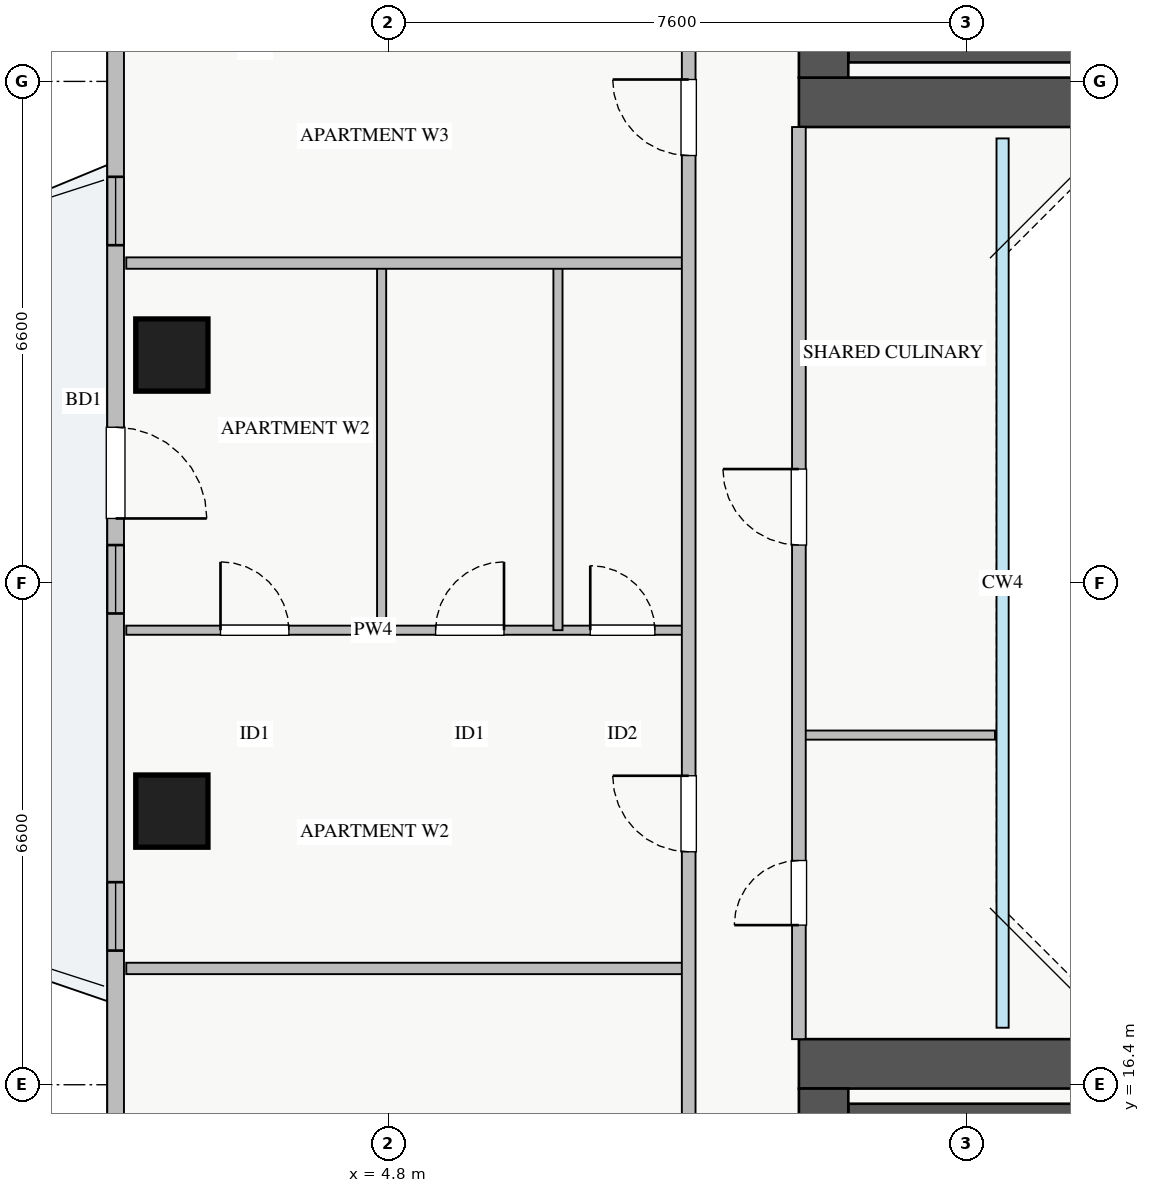
"""IFC4 building model, lengths in metres.
Left out: names, types, materials, properties, quantities, classifications, styles, units other than length and angle.
Written with IfcOpenShell. Run it as: python <this file> out.ifc"""

import sys

from ifc_helpers import new_model, si_unit, direction, frame, frame_2d, origin, origin_2d, place, context, subcontext, project, spatial, rectangle, extrude, source, transform, mapped, element, fill, save


model = new_model("IFC4")
c1 = context("Model", 3, precision=1e-05, world=origin(), true_north=direction((0.0, 1.0)))
c2 = subcontext(c1, "Body", "Model", "MODEL_VIEW")
j1 = project(units=[si_unit("LENGTHUNIT", "METRE"), si_unit("PLANEANGLEUNIT", "RADIAN")], contexts=[c1])
p1 = place(None, origin())
s1 = spatial("IfcSite", under=j1, at=p1, CompositionType="ELEMENT")
p2 = place(p1, origin())
s2 = spatial("IfcBuilding", under=s1, at=p2, CompositionType="ELEMENT")
p3 = place(p2, frame((0.0, 0.0, 143.75)))
s3 = spatial("IfcBuildingStorey", under=s2, at=p3, CompositionType="ELEMENT", Elevation=143.75)
for number, where, z_axis, x_axis in (
    (1, (10.85, 29.95, 0.0), (0.0, 0.0, 1.0), (1.0, 0.0, 0.0)),
    (2, (10.85, 16.05, 0.0), (0.0, 0.0, 1.0), (1.0, 0.0, 0.0)),
):
    element("IfcWall", number, at=place(p3, frame(where, z_axis=z_axis, x_axis=x_axis)), inside=s3, PredefinedType="SHEAR", context=c2, shape_type="SweptSolid", body=[
        extrude(rectangle(XDim=7.3, YDim=0.2, at=frame_2d((3.65, 0.0))), origin(), (0.0, 0.0, 1.0), 3.25),
    ])
p4 = place(p3, frame((10.2, 29.325, 0.0), z_axis=(0.0, 0.0, 1.0), x_axis=(1.0, 0.0, 0.0)))
e3 = element("IfcWall", 3, at=p4, inside=s3, PredefinedType="SHEAR", context=c2, shape_type="SweptSolid", body=[
    extrude(rectangle(XDim=17.6, YDim=0.65, at=frame_2d((8.8, 0.0))), origin(), (0.0, 0.0, 1.0), 3.25),
])
p5 = place(p3, frame((10.525, 29.65, 0.0), z_axis=(0.0, 0.0, 1.0), x_axis=(0.0, 1.0, 0.0)))
e4 = element("IfcWall", 4, at=p5, inside=s3, PredefinedType="SHEAR", context=c2, shape_type="SweptSolid", body=[
    extrude(rectangle(XDim=5.9, YDim=0.65, at=frame_2d((2.95, 0.0))), origin(), (0.0, 0.0, 1.0), 3.25),
])
p6 = place(p3, frame((10.2, 16.675, 0.0), z_axis=(0.0, 0.0, 1.0), x_axis=(1.0, 0.0, 0.0)))
e5 = element("IfcWall", 5, at=p6, inside=s3, PredefinedType="SHEAR", context=c2, shape_type="SweptSolid", body=[
    extrude(rectangle(XDim=17.6, YDim=0.65, at=frame_2d((8.8, 0.0))), origin(), (0.0, 0.0, 1.0), 3.25),
])
p7 = place(p3, frame((10.525, 10.45, 0.0), z_axis=(0.0, 0.0, 1.0), x_axis=(0.0, 1.0, 0.0)))
e6 = element("IfcWall", 6, at=p7, inside=s3, PredefinedType="SHEAR", context=c2, shape_type="SweptSolid", body=[
    extrude(rectangle(XDim=5.9, YDim=0.65, at=frame_2d((2.95, 0.0))), origin(), (0.0, 0.0, 1.0), 3.25),
])
m1 = source(origin(), c2, "Body", "SweptSolid", [
    extrude(rectangle(XDim=0.95, YDim=0.95, at=origin_2d()), origin(), (0.0, 0.0, 1.0), 3.25),
])
for number, where, z_axis, x_axis in (
    (7, (1.95, 26.0, 0.0), (0.0, 0.0, 1.0), (1.0, 0.0, 0.0)),
    (8, (1.95, 20.0, 0.0), (0.0, 0.0, 1.0), (1.0, 0.0, 0.0)),
):
    element("IfcColumn", number, at=place(p3, frame(where, z_axis=z_axis, x_axis=x_axis)), inside=s3, PredefinedType="COLUMN", context=c2, shape_type="MappedRepresentation", body=[
        mapped(m1, transform((0.0, 0.0, 0.0), x_axis=(1.0, 0.0, 0.0), y_axis=(0.0, 1.0, 0.0), z_axis=(0.0, 0.0, 1.0), scale=1.0)),
    ])
p8 = place(p3, frame((1.21, 10.55, 0.0), z_axis=(0.0, 0.0, 1.0), x_axis=(0.0, 1.0, 0.0)))
e9 = element("IfcWall", 9, at=p8, inside=s3, PredefinedType="STANDARD", context=c2, shape_type="SweptSolid", body=[
    extrude(rectangle(XDim=24.9, YDim=0.22, at=frame_2d((12.45, 0.0))), origin(), (0.0, 0.0, 1.0), 2.61),
])
p9 = place(p8, frame((13.3, 0.0, 0.0)))
e10 = element("IfcOpeningElement", 10, at=p9, cuts=e9, PredefinedType="OPENING", context=c2, shape_type="SweptSolid", body=[
    extrude(rectangle(XDim=1.2, YDim=2.1, at=frame_2d((0.6, 1.05))), frame((0.0, 0.12, 0.0), z_axis=(0.0, -1.0, 0.0), x_axis=(1.0, 0.0, 0.0)), (0.0, 0.0, 1.0), 0.24),
])
p10 = place(p8, frame((1.912, 0.0, 0.9)))
e11 = element("IfcOpeningElement", 11, at=p10, cuts=e9, PredefinedType="OPENING", context=c2, shape_type="SweptSolid", body=[
    extrude(rectangle(XDim=2.4, YDim=1.48, at=frame_2d((1.2, 0.74))), frame((0.0, 0.12, 0.0), z_axis=(0.0, -1.0, 0.0), x_axis=(1.0, 0.0, 0.0)), (0.0, 0.0, 1.0), 0.24),
])
p11 = place(p8, frame((21.82, 0.0, 0.9)))
e12 = element("IfcOpeningElement", 12, at=p11, cuts=e9, PredefinedType="OPENING", context=c2, shape_type="SweptSolid", body=[
    extrude(rectangle(XDim=2.1, YDim=1.5, at=frame_2d((1.05, 0.75))), frame((0.0, 0.12, 0.0), z_axis=(0.0, -1.0, 0.0), x_axis=(1.0, 0.0, 0.0)), (0.0, 0.0, 1.0), 0.24),
])
p12 = place(p8, frame((12.05, 0.0, 0.9)))
e13 = element("IfcOpeningElement", 13, at=p12, cuts=e9, PredefinedType="OPENING", context=c2, shape_type="SweptSolid", body=[
    extrude(rectangle(XDim=0.9, YDim=1.2, at=frame_2d((0.45, 0.6))), frame((0.0, 0.12, 0.0), z_axis=(0.0, -1.0, 0.0), x_axis=(1.0, 0.0, 0.0)), (0.0, 0.0, 1.0), 0.24),
])
p13 = place(p8, frame((7.615, 0.0, 0.9)))
e14 = element("IfcOpeningElement", 14, at=p13, cuts=e9, PredefinedType="OPENING", context=c2, shape_type="SweptSolid", body=[
    extrude(rectangle(XDim=0.9, YDim=1.2, at=frame_2d((0.45, 0.6))), frame((0.0, 0.12, 0.0), z_axis=(0.0, -1.0, 0.0), x_axis=(1.0, 0.0, 0.0)), (0.0, 0.0, 1.0), 0.24),
])
p14 = place(p8, frame((16.895, 0.0, 0.9)))
e15 = element("IfcOpeningElement", 15, at=p14, cuts=e9, PredefinedType="OPENING", context=c2, shape_type="SweptSolid", body=[
    extrude(rectangle(XDim=0.9, YDim=1.2, at=frame_2d((0.45, 0.6))), frame((0.0, 0.12, 0.0), z_axis=(0.0, -1.0, 0.0), x_axis=(1.0, 0.0, 0.0)), (0.0, 0.0, 1.0), 0.24),
])
p15 = place(p3, frame((1.35, 22.38, 0.0), z_axis=(0.0, 0.0, 1.0), x_axis=(1.0, 0.0, 0.0)))
e16 = element("IfcWall", 16, at=p15, inside=s3, PredefinedType="PLUMBINGWALL", context=c2, shape_type="SweptSolid", body=[
    extrude(rectangle(XDim=7.4, YDim=0.12, at=frame_2d((3.7, 0.0))), origin(), (0.0, 0.0, 1.0), 3.07),
])
p16 = place(p15, frame((1.24, 0.0, 0.0)))
e17 = element("IfcOpeningElement", 17, at=p16, cuts=e16, PredefinedType="OPENING", context=c2, shape_type="SweptSolid", body=[
    extrude(rectangle(XDim=0.9, YDim=2.05, at=frame_2d((0.45, 1.025))), frame((0.0, 0.07, 0.0), z_axis=(0.0, -1.0, 0.0), x_axis=(1.0, 0.0, 0.0)), (0.0, 0.0, 1.0), 0.14),
])
p17 = place(p15, frame((4.07, 0.0, 0.0)))
e18 = element("IfcOpeningElement", 18, at=p17, cuts=e16, PredefinedType="OPENING", context=c2, shape_type="SweptSolid", body=[
    extrude(rectangle(XDim=0.9, YDim=2.05, at=frame_2d((0.45, 1.025))), frame((0.0, 0.07, 0.0), z_axis=(0.0, -1.0, 0.0), x_axis=(1.0, 0.0, 0.0)), (0.0, 0.0, 1.0), 0.14),
])
p18 = place(p15, frame((6.105, 0.0, 0.0)))
e19 = element("IfcOpeningElement", 19, at=p18, cuts=e16, PredefinedType="OPENING", context=c2, shape_type="SweptSolid", body=[
    extrude(rectangle(XDim=0.85, YDim=2.05, at=frame_2d((0.425, 1.025))), frame((0.0, 0.07, 0.0), z_axis=(0.0, -1.0, 0.0), x_axis=(1.0, 0.0, 0.0)), (0.0, 0.0, 1.0), 0.14),
])
for number, where, z_axis, x_axis in (
    (20, (4.71, 22.38, 0.0), (0.0, 0.0, 1.0), (0.0, 1.0, 0.0)),
    (21, (7.03, 22.38, 0.0), (0.0, 0.0, 1.0), (0.0, 1.0, 0.0)),
):
    element("IfcWall", number, at=place(p3, frame(where, z_axis=z_axis, x_axis=x_axis)), inside=s3, PredefinedType="PLUMBINGWALL", context=c2, shape_type="SweptSolid", body=[
        extrude(rectangle(XDim=4.83, YDim=0.12, at=frame_2d((2.415, 0.0))), origin(), (0.0, 0.0, 1.0), 3.07),
    ])
for number, where, z_axis, x_axis in (
    (22, (1.35, 17.93, 0.0), (0.0, 0.0, 1.0), (1.0, 0.0, 0.0)),
    (23, (1.35, 27.21, 0.0), (0.0, 0.0, 1.0), (1.0, 0.0, 0.0)),
):
    element("IfcWall", number, at=place(p3, frame(where, z_axis=z_axis, x_axis=x_axis)), inside=s3, PredefinedType="PARTITIONING", context=c2, shape_type="SweptSolid", body=[
        extrude(rectangle(XDim=7.4, YDim=0.15, at=frame_2d((3.7, 0.0))), origin(), (0.0, 0.0, 1.0), 3.07),
    ])
p19 = place(p3, frame((8.75, 8.3, 0.0), z_axis=(0.0, 0.0, 1.0), x_axis=(0.0, 1.0, 0.0)))
e24 = element("IfcWall", 24, at=p19, inside=s3, PredefinedType="PARTITIONING", context=c2, shape_type="SweptSolid", body=[
    extrude(rectangle(XDim=29.4, YDim=0.18, at=frame_2d((14.7, 0.0))), origin(), (0.0, 0.0, 1.0), 3.07),
])
p20 = place(p19, frame((28.08, 0.0, 0.0)))
e25 = element("IfcOpeningElement", 25, at=p20, cuts=e24, PredefinedType="OPENING", context=c2, shape_type="SweptSolid", body=[
    extrude(rectangle(XDim=0.9, YDim=2.05, at=frame_2d((0.45, 1.025))), frame((0.0, 0.1, 0.0), z_axis=(0.0, -1.0, 0.0), x_axis=(1.0, 0.0, 0.0)), (0.0, 0.0, 1.0), 0.2),
])
p21 = place(p19, frame((0.245, 0.0, 0.0)))
e26 = element("IfcOpeningElement", 26, at=p21, cuts=e24, PredefinedType="OPENING", context=c2, shape_type="SweptSolid", body=[
    extrude(rectangle(XDim=0.9, YDim=2.05, at=frame_2d((0.45, 1.025))), frame((0.0, 0.1, 0.0), z_axis=(0.0, -1.0, 0.0), x_axis=(1.0, 0.0, 0.0)), (0.0, 0.0, 1.0), 0.2),
])
p22 = place(p19, frame((5.0, 0.0, 0.0)))
e27 = element("IfcOpeningElement", 27, at=p22, cuts=e24, PredefinedType="OPENING", context=c2, shape_type="SweptSolid", body=[
    extrude(rectangle(XDim=1.0, YDim=2.05, at=frame_2d((0.5, 1.025))), frame((0.0, 0.1, 0.0), z_axis=(0.0, -1.0, 0.0), x_axis=(1.0, 0.0, 0.0)), (0.0, 0.0, 1.0), 0.2),
])
p23 = place(p19, frame((11.165, 0.0, 0.0)))
e28 = element("IfcOpeningElement", 28, at=p23, cuts=e24, PredefinedType="OPENING", context=c2, shape_type="SweptSolid", body=[
    extrude(rectangle(XDim=1.0, YDim=2.05, at=frame_2d((0.5, 1.025))), frame((0.0, 0.1, 0.0), z_axis=(0.0, -1.0, 0.0), x_axis=(1.0, 0.0, 0.0)), (0.0, 0.0, 1.0), 0.2),
])
p24 = place(p19, frame((20.325, 0.0, 0.0)))
e29 = element("IfcOpeningElement", 29, at=p24, cuts=e24, PredefinedType="OPENING", context=c2, shape_type="SweptSolid", body=[
    extrude(rectangle(XDim=1.0, YDim=2.05, at=frame_2d((0.5, 1.025))), frame((0.0, 0.1, 0.0), z_axis=(0.0, -1.0, 0.0), x_axis=(1.0, 0.0, 0.0)), (0.0, 0.0, 1.0), 0.2),
])
p25 = place(p3, frame((10.2, 21.0, 0.0), z_axis=(0.0, 0.0, 1.0), x_axis=(1.0, 0.0, 0.0)))
e30 = element("IfcWall", 30, at=p25, inside=s3, PredefinedType="PLUMBINGWALL", context=c2, shape_type="SweptSolid", body=[
    extrude(rectangle(XDim=2.58, YDim=0.12, at=frame_2d((1.29, 0.0))), origin(), (0.0, 0.0, 1.0), 3.07),
])
p26 = place(p3, frame((10.2, 17.0, 0.0), z_axis=(0.0, 0.0, 1.0), x_axis=(0.0, 1.0, 0.0)))
e31 = element("IfcWall", 31, at=p26, inside=s3, PredefinedType="PARTITIONING", context=c2, shape_type="SweptSolid", body=[
    extrude(rectangle(XDim=12.0, YDim=0.18, at=frame_2d((6.0, 0.0))), origin(), (0.0, 0.0, 1.0), 3.07),
])
p27 = place(p26, frame((1.5, 0.0, 0.0)))
e32 = element("IfcOpeningElement", 32, at=p27, cuts=e31, PredefinedType="OPENING", context=c2, shape_type="SweptSolid", body=[
    extrude(rectangle(XDim=0.85, YDim=2.05, at=frame_2d((0.425, 1.025))), frame((0.0, 0.1, 0.0), z_axis=(0.0, -1.0, 0.0), x_axis=(1.0, 0.0, 0.0)), (0.0, 0.0, 1.0), 0.2),
])
p28 = place(p26, frame((6.5, 0.0, 0.0)))
e33 = element("IfcOpeningElement", 33, at=p28, cuts=e31, PredefinedType="OPENING", context=c2, shape_type="SweptSolid", body=[
    extrude(rectangle(XDim=1.0, YDim=2.05, at=frame_2d((0.5, 1.025))), frame((0.0, 0.1, 0.0), z_axis=(0.0, -1.0, 0.0), x_axis=(1.0, 0.0, 0.0)), (0.0, 0.0, 1.0), 0.2),
])
m2 = source(origin(), c2, "Body", "SweptSolid", [
    extrude(rectangle(XDim=1.2, YDim=2.1, at=frame_2d((0.6, 1.05))), frame((0.0, 0.025, 0.0), z_axis=(0.0, -1.0, 0.0), x_axis=(1.0, 0.0, 0.0)), (0.0, 0.0, 1.0), 0.05),
])
p29 = place(p9, frame((1.2, 0.0, 0.0), z_axis=(0.0, 0.0, 1.0), x_axis=(-1.0, 0.0, 0.0)))
e34 = element("IfcDoor", 34, at=p29, inside=s3, OperationType="SINGLE_SWING_LEFT", PredefinedType="DOOR", context=c2, shape_type="MappedRepresentation", body=[
    mapped(m2, transform((0.0, 0.0, 0.0), x_axis=(1.0, 0.0, 0.0), y_axis=(0.0, 1.0, 0.0), z_axis=(0.0, 0.0, 1.0), scale=1.0)),
])
fill(e10, e34)
m3 = source(origin(), c2, "Body", "SweptSolid", [
    extrude(rectangle(XDim=0.9, YDim=2.05, at=frame_2d((0.45, 1.025))), frame((0.0, 0.025, 0.0), z_axis=(0.0, -1.0, 0.0), x_axis=(1.0, 0.0, 0.0)), (0.0, 0.0, 1.0), 0.05),
])
p30 = place(p16, origin())
e35 = element("IfcDoor", 35, at=p30, inside=s3, OperationType="SINGLE_SWING_LEFT", PredefinedType="DOOR", context=c2, shape_type="MappedRepresentation", body=[
    mapped(m3, transform((0.0, 0.0, 0.0), x_axis=(1.0, 0.0, 0.0), y_axis=(0.0, 1.0, 0.0), z_axis=(0.0, 0.0, 1.0), scale=1.0)),
])
fill(e17, e35)
p31 = place(p17, origin())
e36 = element("IfcDoor", 36, at=p31, inside=s3, OperationType="SINGLE_SWING_RIGHT", PredefinedType="DOOR", context=c2, shape_type="MappedRepresentation", body=[
    mapped(m3, transform((0.0, 0.0, 0.0), x_axis=(1.0, 0.0, 0.0), y_axis=(0.0, 1.0, 0.0), z_axis=(0.0, 0.0, 1.0), scale=1.0)),
])
fill(e18, e36)
m4 = source(origin(), c2, "Body", "SweptSolid", [
    extrude(rectangle(XDim=0.85, YDim=2.05, at=frame_2d((0.425, 1.025))), frame((0.0, 0.025, 0.0), z_axis=(0.0, -1.0, 0.0), x_axis=(1.0, 0.0, 0.0)), (0.0, 0.0, 1.0), 0.05),
])
p32 = place(p18, origin())
e37 = element("IfcDoor", 37, at=p32, inside=s3, OperationType="SINGLE_SWING_LEFT", PredefinedType="DOOR", context=c2, shape_type="MappedRepresentation", body=[
    mapped(m4, transform((0.0, 0.0, 0.0), x_axis=(1.0, 0.0, 0.0), y_axis=(0.0, 1.0, 0.0), z_axis=(0.0, 0.0, 1.0), scale=1.0)),
])
fill(e19, e37)
m5 = source(origin(), c2, "Body", "SweptSolid", [
    extrude(rectangle(XDim=1.0, YDim=2.05, at=frame_2d((0.5, 1.025))), frame((0.0, 0.025, 0.0), z_axis=(0.0, -1.0, 0.0), x_axis=(1.0, 0.0, 0.0)), (0.0, 0.0, 1.0), 0.05),
])
p33 = place(p23, origin())
e38 = element("IfcDoor", 38, at=p33, inside=s3, OperationType="SINGLE_SWING_RIGHT", PredefinedType="DOOR", context=c2, shape_type="MappedRepresentation", body=[
    mapped(m5, transform((0.0, 0.0, 0.0), x_axis=(1.0, 0.0, 0.0), y_axis=(0.0, 1.0, 0.0), z_axis=(0.0, 0.0, 1.0), scale=1.0)),
])
fill(e28, e38)
p34 = place(p24, origin())
e39 = element("IfcDoor", 39, at=p34, inside=s3, OperationType="SINGLE_SWING_RIGHT", PredefinedType="DOOR", context=c2, shape_type="MappedRepresentation", body=[
    mapped(m5, transform((0.0, 0.0, 0.0), x_axis=(1.0, 0.0, 0.0), y_axis=(0.0, 1.0, 0.0), z_axis=(0.0, 0.0, 1.0), scale=1.0)),
])
fill(e29, e39)
p35 = place(p27, origin())
e40 = element("IfcDoor", 40, at=p35, inside=s3, OperationType="SINGLE_SWING_LEFT", PredefinedType="DOOR", context=c2, shape_type="MappedRepresentation", body=[
    mapped(m4, transform((0.0, 0.0, 0.0), x_axis=(1.0, 0.0, 0.0), y_axis=(0.0, 1.0, 0.0), z_axis=(0.0, 0.0, 1.0), scale=1.0)),
])
fill(e32, e40)
p36 = place(p28, origin())
e41 = element("IfcDoor", 41, at=p36, inside=s3, OperationType="SINGLE_SWING_RIGHT", PredefinedType="DOOR", context=c2, shape_type="MappedRepresentation", body=[
    mapped(m5, transform((0.0, 0.0, 0.0), x_axis=(1.0, 0.0, 0.0), y_axis=(0.0, 1.0, 0.0), z_axis=(0.0, 0.0, 1.0), scale=1.0)),
])
fill(e33, e41)
m6 = source(origin(), c2, "Body", "SweptSolid", [
    extrude(rectangle(XDim=0.9, YDim=1.2, at=frame_2d((0.45, 0.6))), frame((0.0, 0.03, 0.0), z_axis=(0.0, -1.0, 0.0), x_axis=(1.0, 0.0, 0.0)), (0.0, 0.0, 1.0), 0.06),
])
p37 = place(p12, origin())
e42 = element("IfcWindow", 42, at=p37, inside=s3, PartitioningType="SINGLE_PANEL", PredefinedType="WINDOW", context=c2, shape_type="MappedRepresentation", body=[
    mapped(m6, transform((0.0, 0.0, 0.0), x_axis=(1.0, 0.0, 0.0), y_axis=(0.0, 1.0, 0.0), z_axis=(0.0, 0.0, 1.0), scale=1.0)),
])
fill(e13, e42)
p38 = place(p13, origin())
e43 = element("IfcWindow", 43, at=p38, inside=s3, PartitioningType="SINGLE_PANEL", PredefinedType="WINDOW", context=c2, shape_type="MappedRepresentation", body=[
    mapped(m6, transform((0.0, 0.0, 0.0), x_axis=(1.0, 0.0, 0.0), y_axis=(0.0, 1.0, 0.0), z_axis=(0.0, 0.0, 1.0), scale=1.0)),
])
fill(e14, e43)
p39 = place(p14, origin())
e44 = element("IfcWindow", 44, at=p39, inside=s3, PartitioningType="SINGLE_PANEL", PredefinedType="WINDOW", context=c2, shape_type="MappedRepresentation", body=[
    mapped(m6, transform((0.0, 0.0, 0.0), x_axis=(1.0, 0.0, 0.0), y_axis=(0.0, 1.0, 0.0), z_axis=(0.0, 0.0, 1.0), scale=1.0)),
])
fill(e15, e44)
save(model, sys.argv[1])
